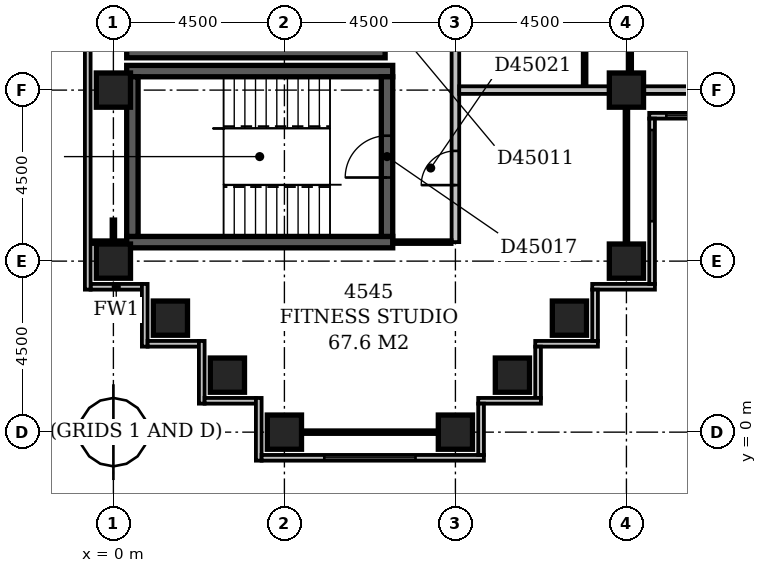
"""IFC4 building model, lengths in metres.
Left out: names, types, materials, properties, quantities, classifications, styles, units other than length and angle.
Written with IfcOpenShell. Run it as: python <this file> out.ifc"""

import sys

from ifc_helpers import new_model, si_unit, direction, frame, frame_2d, origin, origin_2d, place, context, subcontext, project, spatial, rectangle, extrude, element, fill, save


model = new_model("IFC4")
c1 = context("Model", 3, precision=1e-05, world=origin(), true_north=direction((0.0, 1.0)))
c2 = subcontext(c1, "Body", "Model", "MODEL_VIEW")
j1 = project(units=[si_unit("LENGTHUNIT", "METRE"), si_unit("PLANEANGLEUNIT", "RADIAN")], contexts=[c1])
p1 = place(None, origin())
s1 = spatial("IfcSite", under=j1, at=p1, CompositionType="ELEMENT")
p2 = place(p1, origin())
s2 = spatial("IfcBuilding", under=s1, at=p2, CompositionType="ELEMENT")
p3 = place(p2, frame((0.0, 0.0, 179.0)))
s3 = spatial("IfcBuildingStorey", under=s2, at=p3, CompositionType="ELEMENT", Elevation=179.0)
for number, where, z_axis, x_axis in (
    (1, (0.35, 5.0, -0.3), (0.0, 0.0, 1.0), (1.0, 0.0, 0.0)),
    (2, (0.35, 9.5, -0.3), (0.0, 0.0, 1.0), (1.0, 0.0, 0.0)),
):
    element("IfcWall", number, at=place(p3, frame(where, z_axis=z_axis, x_axis=x_axis)), inside=s3, PredefinedType="SHEAR", context=c2, shape_type="SweptSolid", body=[
        extrude(rectangle(XDim=7.0, YDim=0.3, at=frame_2d((3.5, 0.0))), origin(), (0.0, 0.0, 1.0), 3.6),
    ])
p4 = place(p3, frame((0.35, 10.0, -0.3), z_axis=(0.0, 0.0, 1.0), x_axis=(1.0, 0.0, 0.0)))
e3 = element("IfcWall", 3, at=p4, inside=s3, PredefinedType="SHEAR", context=c2, shape_type="SweptSolid", body=[
    extrude(rectangle(XDim=6.8, YDim=0.3, at=frame_2d((3.4, 0.0))), origin(), (0.0, 0.0, 1.0), 3.6),
])
p5 = place(p3, frame((0.5, 5.15, -0.3), z_axis=(0.0, 0.0, 1.0), x_axis=(0.0, 1.0, 0.0)))
e4 = element("IfcWall", 4, at=p5, inside=s3, PredefinedType="SHEAR", context=c2, shape_type="SweptSolid", body=[
    extrude(rectangle(XDim=4.2, YDim=0.3, at=frame_2d((2.1, 0.0))), origin(), (0.0, 0.0, 1.0), 3.6),
])
p6 = place(p3, frame((7.2, 5.15, -0.3), z_axis=(0.0, 0.0, 1.0), x_axis=(0.0, 1.0, 0.0)))
e5 = element("IfcWall", 5, at=p6, inside=s3, PredefinedType="SHEAR", context=c2, shape_type="SweptSolid", body=[
    extrude(rectangle(XDim=4.2, YDim=0.3, at=frame_2d((2.1, 0.0))), origin(), (0.0, 0.0, 1.0), 3.6),
])
p7 = place(p6, frame((1.55, 0.0, 0.3)))
e6 = element("IfcOpeningElement", 6, at=p7, cuts=e5, PredefinedType="OPENING", context=c2, shape_type="SweptSolid", body=[
    extrude(rectangle(XDim=1.1, YDim=2.1, at=frame_2d((0.55, 1.05))), frame((0.0, 0.162, 0.0), z_axis=(0.0, -1.0, 0.0), x_axis=(1.0, 0.0, 0.0)), (0.0, 0.0, 1.0), 0.324),
])
for number, where, z_axis, x_axis in (
    (7, (4.5, 0.0, -0.3), (0.0, 0.0, 1.0), (1.0, 0.0, 0.0)),
    (8, (9.0, 0.0, -0.3), (0.0, 0.0, 1.0), (1.0, 0.0, 0.0)),
    (9, (3.0, 1.5, -0.3), (0.0, 0.0, 1.0), (1.0, 0.0, 0.0)),
    (10, (10.5, 1.5, -0.3), (0.0, 0.0, 1.0), (1.0, 0.0, 0.0)),
    (11, (1.5, 3.0, -0.3), (0.0, 0.0, 1.0), (1.0, 0.0, 0.0)),
    (12, (12.0, 3.0, -0.3), (0.0, 0.0, 1.0), (1.0, 0.0, 0.0)),
    (13, (0.0, 4.5, -0.3), (0.0, 0.0, 1.0), (1.0, 0.0, 0.0)),
    (14, (13.5, 4.5, -0.3), (0.0, 0.0, 1.0), (1.0, 0.0, 0.0)),
    (15, (0.0, 9.0, -0.3), (0.0, 0.0, 1.0), (1.0, 0.0, 0.0)),
    (16, (13.5, 9.0, -0.3), (0.0, 0.0, 1.0), (1.0, 0.0, 0.0)),
):
    element("IfcColumn", number, at=place(p3, frame(where, z_axis=z_axis, x_axis=x_axis)), inside=s3, PredefinedType="COLUMN", context=c2, shape_type="SweptSolid", body=[
        extrude(rectangle(XDim=0.9, YDim=0.9, at=origin_2d()), origin(), (0.0, 0.0, 1.0), 3.6),
    ])
p8 = place(p3, frame((9.675, -0.6, 0.0), z_axis=(0.0, 0.0, 1.0), x_axis=(0.0, 1.0, 0.0)))
e17 = element("IfcWall", 17, at=p8, inside=s3, PredefinedType="STANDARD", context=c2, shape_type="SweptSolid", body=[
    extrude(rectangle(XDim=1.35, YDim=0.15, at=frame_2d((0.675, 0.0))), origin(), (0.0, 0.0, 1.0), 2.7),
])
p9 = place(p3, frame((9.6, 0.825, 0.0), z_axis=(0.0, 0.0, 1.0), x_axis=(1.0, 0.0, 0.0)))
e18 = element("IfcWall", 18, at=p9, inside=s3, PredefinedType="STANDARD", context=c2, shape_type="SweptSolid", body=[
    extrude(rectangle(XDim=1.65, YDim=0.15, at=frame_2d((0.825, 0.0))), origin(), (0.0, 0.0, 1.0), 2.7),
])
p10 = place(p3, frame((11.175, 0.9, 0.0), z_axis=(0.0, 0.0, 1.0), x_axis=(0.0, 1.0, 0.0)))
e19 = element("IfcWall", 19, at=p10, inside=s3, PredefinedType="STANDARD", context=c2, shape_type="SweptSolid", body=[
    extrude(rectangle(XDim=1.35, YDim=0.15, at=frame_2d((0.675, 0.0))), origin(), (0.0, 0.0, 1.0), 2.7),
])
p11 = place(p3, frame((11.1, 2.325, 0.0), z_axis=(0.0, 0.0, 1.0), x_axis=(1.0, 0.0, 0.0)))
e20 = element("IfcWall", 20, at=p11, inside=s3, PredefinedType="STANDARD", context=c2, shape_type="SweptSolid", body=[
    extrude(rectangle(XDim=1.65, YDim=0.15, at=frame_2d((0.825, 0.0))), origin(), (0.0, 0.0, 1.0), 2.7),
])
p12 = place(p3, frame((12.675, 2.4, 0.0), z_axis=(0.0, 0.0, 1.0), x_axis=(0.0, 1.0, 0.0)))
e21 = element("IfcWall", 21, at=p12, inside=s3, PredefinedType="STANDARD", context=c2, shape_type="SweptSolid", body=[
    extrude(rectangle(XDim=1.35, YDim=0.15, at=frame_2d((0.675, 0.0))), origin(), (0.0, 0.0, 1.0), 2.7),
])
p13 = place(p3, frame((12.6, 3.825, 0.0), z_axis=(0.0, 0.0, 1.0), x_axis=(1.0, 0.0, 0.0)))
e22 = element("IfcWall", 22, at=p13, inside=s3, PredefinedType="STANDARD", context=c2, shape_type="SweptSolid", body=[
    extrude(rectangle(XDim=1.65, YDim=0.15, at=frame_2d((0.825, 0.0))), origin(), (0.0, 0.0, 1.0), 2.7),
])
p14 = place(p3, frame((14.175, 3.9, 0.0), z_axis=(0.0, 0.0, 1.0), x_axis=(0.0, 1.0, 0.0)))
e23 = element("IfcWall", 23, at=p14, inside=s3, PredefinedType="STANDARD", context=c2, shape_type="SweptSolid", body=[
    extrude(rectangle(XDim=4.35, YDim=0.15, at=frame_2d((2.175, 0.0))), origin(), (0.0, 0.0, 1.0), 2.7),
])
p15 = place(p14, frame((1.65, 0.0, 0.6)))
e24 = element("IfcOpeningElement", 24, at=p15, cuts=e23, PredefinedType="OPENING", context=c2, shape_type="SweptSolid", body=[
    extrude(rectangle(XDim=2.4, YDim=1.8, at=frame_2d((1.2, 0.9))), frame((0.0, 0.087, 0.0), z_axis=(0.0, -1.0, 0.0), x_axis=(1.0, 0.0, 0.0)), (0.0, 0.0, 1.0), 0.174),
])
p16 = place(p3, frame((14.1, 8.325, 0.0), z_axis=(0.0, 0.0, 1.0), x_axis=(1.0, 0.0, 0.0)))
e25 = element("IfcWall", 25, at=p16, inside=s3, PredefinedType="STANDARD", context=c2, shape_type="SweptSolid", body=[
    extrude(rectangle(XDim=4.65, YDim=0.15, at=frame_2d((2.325, 0.0))), origin(), (0.0, 0.0, 1.0), 2.7),
])
p17 = place(p16, frame((0.45, 0.0, 0.6)))
e26 = element("IfcOpeningElement", 26, at=p17, cuts=e25, PredefinedType="OPENING", context=c2, shape_type="SweptSolid", body=[
    extrude(rectangle(XDim=2.4, YDim=1.8, at=frame_2d((1.2, 0.9))), frame((0.0, 0.087, 0.0), z_axis=(0.0, -1.0, 0.0), x_axis=(1.0, 0.0, 0.0)), (0.0, 0.0, 1.0), 0.174),
])
p18 = place(p3, frame((-0.675, 59.1, 0.0), z_axis=(0.0, 0.0, 1.0), x_axis=(0.0, -1.0, 0.0)))
e27 = element("IfcWall", 27, at=p18, inside=s3, PredefinedType="STANDARD", context=c2, shape_type="SweptSolid", body=[
    extrude(rectangle(XDim=55.35, YDim=0.15, at=frame_2d((27.675, 0.0))), origin(), (0.0, 0.0, 1.0), 2.7),
])
p19 = place(p3, frame((-0.6, 3.825, 0.0), z_axis=(0.0, 0.0, 1.0), x_axis=(1.0, 0.0, 0.0)))
e28 = element("IfcWall", 28, at=p19, inside=s3, PredefinedType="STANDARD", context=c2, shape_type="SweptSolid", body=[
    extrude(rectangle(XDim=1.35, YDim=0.15, at=frame_2d((0.675, 0.0))), origin(), (0.0, 0.0, 1.0), 2.7),
])
p20 = place(p3, frame((0.825, 3.9, 0.0), z_axis=(0.0, 0.0, 1.0), x_axis=(0.0, -1.0, 0.0)))
e29 = element("IfcWall", 29, at=p20, inside=s3, PredefinedType="STANDARD", context=c2, shape_type="SweptSolid", body=[
    extrude(rectangle(XDim=1.65, YDim=0.15, at=frame_2d((0.825, 0.0))), origin(), (0.0, 0.0, 1.0), 2.7),
])
p21 = place(p3, frame((0.9, 2.325, 0.0), z_axis=(0.0, 0.0, 1.0), x_axis=(1.0, 0.0, 0.0)))
e30 = element("IfcWall", 30, at=p21, inside=s3, PredefinedType="STANDARD", context=c2, shape_type="SweptSolid", body=[
    extrude(rectangle(XDim=1.35, YDim=0.15, at=frame_2d((0.675, 0.0))), origin(), (0.0, 0.0, 1.0), 2.7),
])
p22 = place(p3, frame((2.325, 2.4, 0.0), z_axis=(0.0, 0.0, 1.0), x_axis=(0.0, -1.0, 0.0)))
e31 = element("IfcWall", 31, at=p22, inside=s3, PredefinedType="STANDARD", context=c2, shape_type="SweptSolid", body=[
    extrude(rectangle(XDim=1.65, YDim=0.15, at=frame_2d((0.825, 0.0))), origin(), (0.0, 0.0, 1.0), 2.7),
])
p23 = place(p3, frame((2.4, 0.825, 0.0), z_axis=(0.0, 0.0, 1.0), x_axis=(1.0, 0.0, 0.0)))
e32 = element("IfcWall", 32, at=p23, inside=s3, PredefinedType="STANDARD", context=c2, shape_type="SweptSolid", body=[
    extrude(rectangle(XDim=1.35, YDim=0.15, at=frame_2d((0.675, 0.0))), origin(), (0.0, 0.0, 1.0), 2.7),
])
p24 = place(p3, frame((3.825, 0.9, 0.0), z_axis=(0.0, 0.0, 1.0), x_axis=(0.0, -1.0, 0.0)))
e33 = element("IfcWall", 33, at=p24, inside=s3, PredefinedType="STANDARD", context=c2, shape_type="SweptSolid", body=[
    extrude(rectangle(XDim=1.65, YDim=0.15, at=frame_2d((0.825, 0.0))), origin(), (0.0, 0.0, 1.0), 2.7),
])
p25 = place(p3, frame((3.9, -0.675, 0.0), z_axis=(0.0, 0.0, 1.0), x_axis=(1.0, 0.0, 0.0)))
e34 = element("IfcWall", 34, at=p25, inside=s3, PredefinedType="STANDARD", context=c2, shape_type="SweptSolid", body=[
    extrude(rectangle(XDim=5.85, YDim=0.15, at=frame_2d((2.925, 0.0))), origin(), (0.0, 0.0, 1.0), 2.7),
])
p26 = place(p25, frame((1.65, 0.0, 0.6)))
e35 = element("IfcOpeningElement", 35, at=p26, cuts=e34, PredefinedType="OPENING", context=c2, shape_type="SweptSolid", body=[
    extrude(rectangle(XDim=2.4, YDim=1.8, at=frame_2d((1.2, 0.9))), frame((0.0, 0.087, 0.0), z_axis=(0.0, -1.0, 0.0), x_axis=(1.0, 0.0, 0.0)), (0.0, 0.0, 1.0), 0.174),
])
p27 = place(p3, frame((4.95, 0.0, 0.0), z_axis=(0.0, 0.0, 1.0), x_axis=(1.0, 0.0, 0.0)))
e36 = element("IfcWall", 36, at=p27, inside=s3, PredefinedType="PARTITIONING", context=c2, shape_type="SweptSolid", body=[
    extrude(rectangle(XDim=3.6, YDim=0.1, at=frame_2d((1.8, 0.0))), origin(), (0.0, 0.0, 1.0), 2.7),
])
p28 = place(p3, frame((0.0, 4.95, 0.0), z_axis=(0.0, 0.0, 1.0), x_axis=(0.0, 1.0, 0.0)))
e37 = element("IfcWall", 37, at=p28, inside=s3, PredefinedType="PARTITIONING", context=c2, shape_type="SweptSolid", body=[
    extrude(rectangle(XDim=0.65, YDim=0.1, at=frame_2d((0.325, 0.0))), origin(), (0.0, 0.0, 1.0), 2.7),
])
p29 = place(p3, frame((13.5, 4.95, 0.0), z_axis=(0.0, 0.0, 1.0), x_axis=(0.0, 1.0, 0.0)))
e38 = element("IfcWall", 38, at=p29, inside=s3, PredefinedType="PARTITIONING", context=c2, shape_type="SweptSolid", body=[
    extrude(rectangle(XDim=3.6, YDim=0.1, at=frame_2d((1.8, 0.0))), origin(), (0.0, 0.0, 1.0), 2.7),
])
p30 = place(p3, frame((-0.6, 5.0, 0.0), z_axis=(0.0, 0.0, 1.0), x_axis=(1.0, 0.0, 0.0)))
e39 = element("IfcWall", 39, at=p30, inside=s3, PredefinedType="PARTITIONING", context=c2, shape_type="SweptSolid", body=[
    extrude(rectangle(XDim=0.951, YDim=0.1, at=frame_2d((0.476, 0.0))), origin(), (0.0, 0.0, 1.0), 3.3),
])
p31 = place(p3, frame((7.349, 5.0, 0.0), z_axis=(0.0, 0.0, 1.0), x_axis=(1.0, 0.0, 0.0)))
e40 = element("IfcWall", 40, at=p31, inside=s3, PredefinedType="PARTITIONING", context=c2, shape_type="SweptSolid", body=[
    extrude(rectangle(XDim=1.551, YDim=0.1, at=frame_2d((0.775, 0.0))), origin(), (0.0, 0.0, 1.0), 3.3),
])
p32 = place(p3, frame((9.0, 5.0, 0.0), z_axis=(0.0, 0.0, 1.0), x_axis=(0.0, 1.0, 0.0)))
e41 = element("IfcWall", 41, at=p32, inside=s3, PredefinedType="PARTITIONING", context=c2, shape_type="SweptSolid", body=[
    extrude(rectangle(XDim=31.0, YDim=0.2, at=frame_2d((15.5, 0.0))), origin(), (0.0, 0.0, 1.0), 3.3),
])
p33 = place(p32, frame((17.8, 0.0, 0.0)))
e42 = element("IfcOpeningElement", 42, at=p33, cuts=e41, PredefinedType="OPENING", context=c2, shape_type="SweptSolid", body=[
    extrude(rectangle(XDim=1.0, YDim=2.1, at=frame_2d((0.5, 1.05))), frame((0.0, 0.112, 0.0), z_axis=(0.0, -1.0, 0.0), x_axis=(1.0, 0.0, 0.0)), (0.0, 0.0, 1.0), 0.224),
])
p34 = place(p32, frame((14.95, 0.0, 0.0)))
e43 = element("IfcOpeningElement", 43, at=p34, cuts=e41, PredefinedType="OPENING", context=c2, shape_type="SweptSolid", body=[
    extrude(rectangle(XDim=1.0, YDim=2.1, at=frame_2d((0.5, 1.05))), frame((0.0, 0.112, 0.0), z_axis=(0.0, -1.0, 0.0), x_axis=(1.0, 0.0, 0.0)), (0.0, 0.0, 1.0), 0.224),
])
p35 = place(p32, frame((9.3, 0.0, 0.0)))
e44 = element("IfcOpeningElement", 44, at=p35, cuts=e41, PredefinedType="OPENING", context=c2, shape_type="SweptSolid", body=[
    extrude(rectangle(XDim=1.0, YDim=2.1, at=frame_2d((0.5, 1.05))), frame((0.0, 0.112, 0.0), z_axis=(0.0, -1.0, 0.0), x_axis=(1.0, 0.0, 0.0)), (0.0, 0.0, 1.0), 0.224),
])
p36 = place(p32, frame((1.5, 0.0, 0.0)))
e45 = element("IfcOpeningElement", 45, at=p36, cuts=e41, PredefinedType="OPENING", context=c2, shape_type="SweptSolid", body=[
    extrude(rectangle(XDim=0.9, YDim=2.1, at=frame_2d((0.45, 1.05))), frame((0.0, 0.112, 0.0), z_axis=(0.0, -1.0, 0.0), x_axis=(1.0, 0.0, 0.0)), (0.0, 0.0, 1.0), 0.224),
])
p37 = place(p3, frame((9.1, 9.0, 0.0), z_axis=(0.0, 0.0, 1.0), x_axis=(1.0, 0.0, 0.0)))
e46 = element("IfcWall", 46, at=p37, inside=s3, PredefinedType="PARTITIONING", context=c2, shape_type="SweptSolid", body=[
    extrude(rectangle(XDim=3.95, YDim=0.2, at=frame_2d((1.975, 0.0))), origin(), (0.0, 0.0, 1.0), 3.3),
])
p38 = place(p3, frame((13.95, 9.0, 0.0), z_axis=(0.0, 0.0, 1.0), x_axis=(1.0, 0.0, 0.0)))
e47 = element("IfcWall", 47, at=p38, inside=s3, PredefinedType="PARTITIONING", context=c2, shape_type="SweptSolid", body=[
    extrude(rectangle(XDim=3.6, YDim=0.2, at=frame_2d((1.8, 0.0))), origin(), (0.0, 0.0, 1.0), 2.7),
])
p39 = place(p3, frame((12.4, 9.1, 0.0), z_axis=(0.0, 0.0, 1.0), x_axis=(0.0, 1.0, 0.0)))
e48 = element("IfcWall", 48, at=p39, inside=s3, PredefinedType="PARTITIONING", context=c2, shape_type="SweptSolid", body=[
    extrude(rectangle(XDim=4.9, YDim=0.1, at=frame_2d((2.45, 0.0))), origin(), (0.0, 0.0, 1.0), 3.3),
])
p40 = place(p39, frame((1.95, 0.0, 0.0)))
e49 = element("IfcOpeningElement", 49, at=p40, cuts=e48, PredefinedType="OPENING", context=c2, shape_type="SweptSolid", body=[
    extrude(rectangle(XDim=0.9, YDim=2.1, at=frame_2d((0.45, 1.05))), frame((0.0, 0.062, 0.0), z_axis=(0.0, -1.0, 0.0), x_axis=(1.0, 0.0, 0.0)), (0.0, 0.0, 1.0), 0.124),
])
p41 = place(p3, frame((13.6, 9.45, 0.0), z_axis=(0.0, 0.0, 1.0), x_axis=(0.0, 1.0, 0.0)))
e50 = element("IfcWall", 50, at=p41, inside=s3, PredefinedType="PARTITIONING", context=c2, shape_type="SweptSolid", body=[
    extrude(rectangle(XDim=8.45, YDim=0.1, at=frame_2d((4.225, 0.0))), origin(), (0.0, 0.0, 1.0), 3.3),
])
p42 = place(p41, frame((1.35, 0.0, 0.0)))
e51 = element("IfcOpeningElement", 51, at=p42, cuts=e50, PredefinedType="OPENING", context=c2, shape_type="SweptSolid", body=[
    extrude(rectangle(XDim=0.9, YDim=2.1, at=frame_2d((0.45, 1.05))), frame((0.0, 0.062, 0.0), z_axis=(0.0, -1.0, 0.0), x_axis=(1.0, 0.0, 0.0)), (0.0, 0.0, 1.0), 0.124),
])
p43 = place(p41, frame((5.85, 0.0, 0.0)))
e52 = element("IfcOpeningElement", 52, at=p43, cuts=e50, PredefinedType="OPENING", context=c2, shape_type="SweptSolid", body=[
    extrude(rectangle(XDim=0.9, YDim=2.1, at=frame_2d((0.45, 1.05))), frame((0.0, 0.062, 0.0), z_axis=(0.0, -1.0, 0.0), x_axis=(1.0, 0.0, 0.0)), (0.0, 0.0, 1.0), 0.124),
])
p44 = place(p15, origin())
e53 = element("IfcWindow", 53, at=p44, inside=s3, PartitioningType="SINGLE_PANEL", PredefinedType="WINDOW", context=c2, shape_type="SweptSolid", body=[
    extrude(rectangle(XDim=2.4, YDim=1.8, at=frame_2d((1.2, 0.9))), frame((0.0, 0.03, 0.0), z_axis=(0.0, -1.0, 0.0), x_axis=(1.0, 0.0, 0.0)), (0.0, 0.0, 1.0), 0.06),
])
fill(e24, e53)
p45 = place(p17, origin())
e54 = element("IfcWindow", 54, at=p45, inside=s3, PartitioningType="SINGLE_PANEL", PredefinedType="WINDOW", context=c2, shape_type="SweptSolid", body=[
    extrude(rectangle(XDim=2.4, YDim=1.8, at=frame_2d((1.2, 0.9))), frame((0.0, 0.03, 0.0), z_axis=(0.0, -1.0, 0.0), x_axis=(1.0, 0.0, 0.0)), (0.0, 0.0, 1.0), 0.06),
])
fill(e26, e54)
p46 = place(p26, origin())
e55 = element("IfcWindow", 55, at=p46, inside=s3, PartitioningType="SINGLE_PANEL", PredefinedType="WINDOW", context=c2, shape_type="SweptSolid", body=[
    extrude(rectangle(XDim=2.4, YDim=1.8, at=frame_2d((1.2, 0.9))), frame((0.0, 0.03, 0.0), z_axis=(0.0, -1.0, 0.0), x_axis=(1.0, 0.0, 0.0)), (0.0, 0.0, 1.0), 0.06),
])
fill(e35, e55)
p47 = place(p7, origin())
e56 = element("IfcDoor", 56, at=p47, inside=s3, OperationType="SINGLE_SWING_LEFT", PredefinedType="DOOR", context=c2, shape_type="SweptSolid", body=[
    extrude(rectangle(XDim=1.1, YDim=2.1, at=frame_2d((0.55, 1.05))), frame((0.0, 0.025, 0.0), z_axis=(0.0, -1.0, 0.0), x_axis=(1.0, 0.0, 0.0)), (0.0, 0.0, 1.0), 0.05),
])
fill(e6, e56)
p48 = place(p36, origin())
e57 = element("IfcDoor", 57, at=p48, inside=s3, OperationType="SINGLE_SWING_LEFT", PredefinedType="DOOR", context=c2, shape_type="SweptSolid", body=[
    extrude(rectangle(XDim=0.9, YDim=2.1, at=frame_2d((0.45, 1.05))), frame((0.0, 0.025, 0.0), z_axis=(0.0, -1.0, 0.0), x_axis=(1.0, 0.0, 0.0)), (0.0, 0.0, 1.0), 0.05),
])
fill(e45, e57)
save(model, sys.argv[1])
